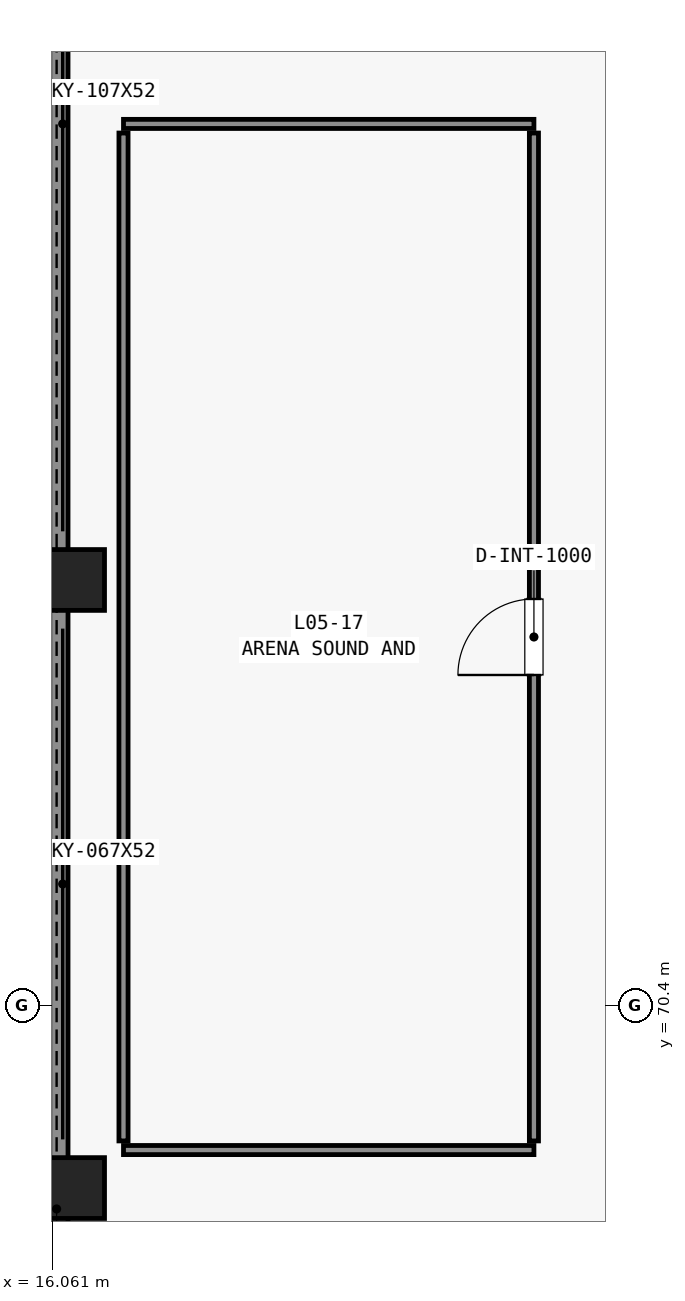
"""IFC4 building model, lengths in metres.
Left out: names, types, materials, properties, quantities, classifications, styles, units other than length and angle.
Written with IfcOpenShell. Run it as: python <this file> out.ifc"""

import sys

from ifc_helpers import new_model, si_unit, direction, frame, frame_2d, origin, origin_2d, place, context, subcontext, project, spatial, rectangle, extrude, element, fill, save


model = new_model("IFC4")
c1 = context("Model", 3, precision=1e-05, world=origin(), true_north=direction((0.0, 1.0)))
c2 = subcontext(c1, "Body", "Model", "MODEL_VIEW")
j1 = project(units=[si_unit("LENGTHUNIT", "METRE"), si_unit("PLANEANGLEUNIT", "RADIAN")], contexts=[c1])
p1 = place(None, origin())
s1 = spatial("IfcSite", under=j1, at=p1, CompositionType="ELEMENT")
p2 = place(p1, origin())
s2 = spatial("IfcBuilding", under=s1, at=p2, CompositionType="ELEMENT")
p3 = place(p2, frame((0.0, 0.0, 26.4)))
s3 = spatial("IfcBuildingStorey", under=s2, at=p3, CompositionType="ELEMENT", Elevation=26.4)
for number, where, z_axis, x_axis in (
    (1, (16.35, 68.0, 0.0), (0.0, 0.0, 1.0), (1.0, 0.0, 0.0)),
    (2, (16.35, 76.0, 0.0), (0.0, 0.0, 1.0), (1.0, 0.0, 0.0)),
):
    element("IfcColumn", number, at=place(p3, frame(where, z_axis=z_axis, x_axis=x_axis)), inside=s3, PredefinedType="PILASTER", context=c2, shape_type="SweptSolid", body=[
        extrude(rectangle(XDim=0.8, YDim=0.8, at=origin_2d()), origin(), (0.0, 0.0, 1.0), 5.18),
    ])
p4 = place(p3, frame((16.15, 32.6, 5.4), z_axis=(0.0, 0.0, 1.0), x_axis=(0.0, 1.0, 0.0)))
e3 = element("IfcWall", 3, at=p4, inside=s3, PredefinedType="PARAPET", context=c2, shape_type="SweptSolid", body=[
    extrude(rectangle(XDim=63.0, YDim=0.24, at=frame_2d((31.5, 0.0))), origin(), (0.0, 0.0, 1.0), 1.0),
])
for number, where, z_axis, x_axis in (
    (4, (17.0, 68.5, 0.0), (0.0, 0.0, 1.0), (1.0, 0.0, 0.0)),
    (5, (17.0, 82.0, 0.0), (0.0, 0.0, 1.0), (1.0, 0.0, 0.0)),
):
    element("IfcWall", number, at=place(p3, frame(where, z_axis=z_axis, x_axis=x_axis)), inside=s3, PredefinedType="PARTITIONING", context=c2, shape_type="SweptSolid", body=[
        extrude(rectangle(XDim=5.4, YDim=0.12, at=frame_2d((2.7, 0.0))), origin(), (0.0, 0.0, 1.0), 5.18),
    ])
p5 = place(p3, frame((17.0, 68.62, 0.0), z_axis=(0.0, 0.0, 1.0), x_axis=(0.0, 1.0, 0.0)))
e6 = element("IfcWall", 6, at=p5, inside=s3, PredefinedType="PARTITIONING", context=c2, shape_type="SweptSolid", body=[
    extrude(rectangle(XDim=13.26, YDim=0.12, at=frame_2d((6.63, 0.0))), origin(), (0.0, 0.0, 1.0), 5.18),
])
p6 = place(p3, frame((22.4, 68.62, 0.0), z_axis=(0.0, 0.0, 1.0), x_axis=(0.0, 1.0, 0.0)))
e7 = element("IfcWall", 7, at=p6, inside=s3, PredefinedType="PARTITIONING", context=c2, shape_type="SweptSolid", body=[
    extrude(rectangle(XDim=13.26, YDim=0.12, at=frame_2d((6.63, 0.0))), origin(), (0.0, 0.0, 1.0), 5.18),
])
p7 = place(p6, frame((6.13, 0.0, 0.0)))
e8 = element("IfcOpeningElement", 8, at=p7, cuts=e7, PredefinedType="OPENING", context=c2, shape_type="SweptSolid", body=[
    extrude(rectangle(XDim=1.0, YDim=2.15, at=frame_2d((0.5, 1.075))), frame((0.0, 0.07, 0.0), z_axis=(0.0, -1.0, 0.0), x_axis=(1.0, 0.0, 0.0)), (0.0, 0.0, 1.0), 0.14),
])
p8 = place(p7, origin())
e9 = element("IfcDoor", 9, at=p8, inside=s3, OperationType="SINGLE_SWING_LEFT", PredefinedType="DOOR", context=c2, shape_type="SweptSolid", body=[
    extrude(rectangle(XDim=1.0, YDim=2.15, at=frame_2d((0.5, 1.075))), frame((0.0, 0.025, 0.0), z_axis=(0.0, -1.0, 0.0), x_axis=(1.0, 0.0, 0.0)), (0.0, 0.0, 1.0), 0.05),
])
fill(e8, e9)
save(model, sys.argv[1])
